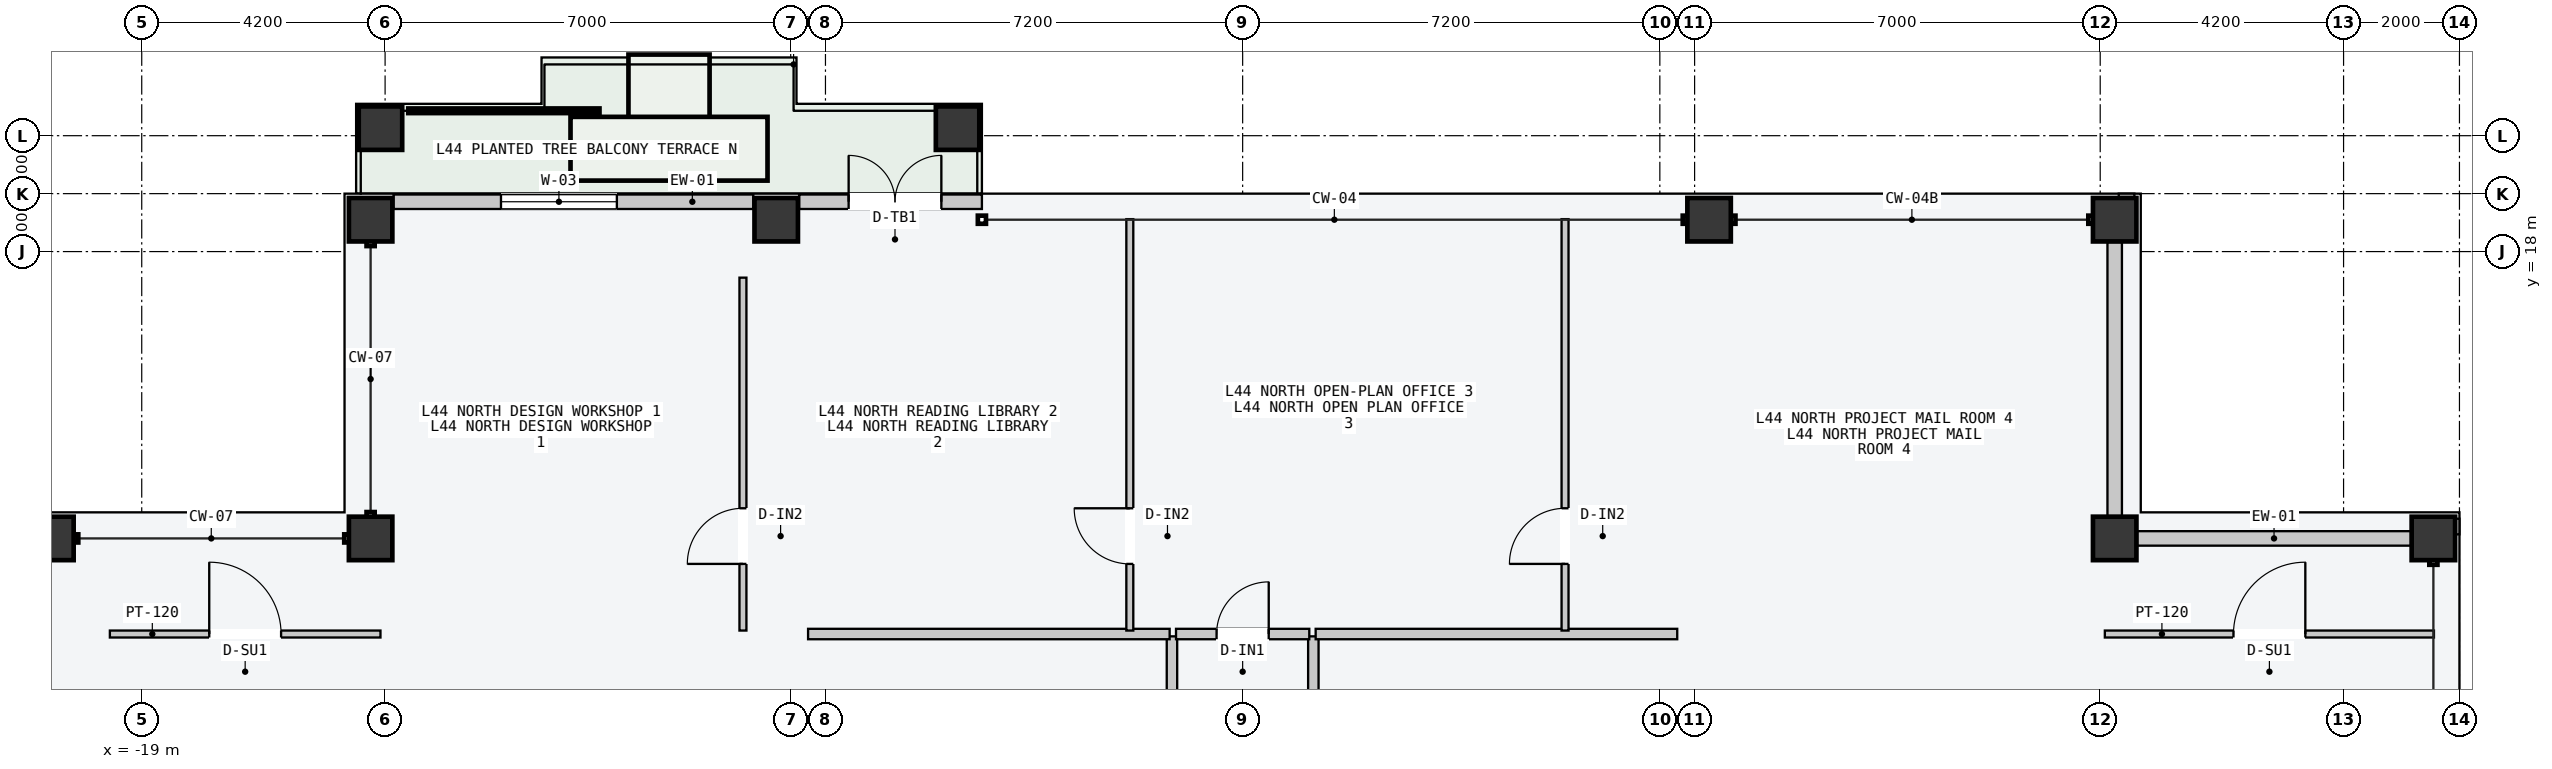
"""IFC4 building model, lengths in metres.
Left out: names, types, materials, properties, quantities, classifications, styles, units other than length and angle.
Written with IfcOpenShell. Run it as: python <this file> out.ifc"""

import sys

from ifc_helpers import new_model, si_unit, direction, frame, frame_2d, origin, origin_2d, place, context, subcontext, project, spatial, rectangle, hollow_rectangle, extrude, element, fill, save


model = new_model("IFC4")
c1 = context("Model", 3, precision=1e-05, world=origin(), true_north=direction((0.0, 1.0)))
c2 = subcontext(c1, "Body", "Model", "MODEL_VIEW")
j1 = project(units=[si_unit("LENGTHUNIT", "METRE"), si_unit("PLANEANGLEUNIT", "RADIAN")], contexts=[c1])
p1 = place(None, origin())
s1 = spatial("IfcSite", under=j1, at=p1, CompositionType="ELEMENT")
p2 = place(p1, origin())
s2 = spatial("IfcBuilding", under=s1, at=p2, CompositionType="ELEMENT")
p3 = place(p2, frame((0.0, 0.0, 169.5)))
s3 = spatial("IfcBuildingStorey", under=s2, at=p3, CompositionType="ELEMENT", Elevation=169.5)
for number, where, z_axis, x_axis in (
    (1, (-15.05, 18.55, 0.0), (0.0, 0.0, 1.0), (1.0, 0.0, 0.0)),
    (2, (-8.05, 18.55, 0.0), (0.0, 0.0, 1.0), (1.0, 0.0, 0.0)),
    (3, (8.05, 18.55, 0.0), (0.0, 0.0, 1.0), (1.0, 0.0, 0.0)),
    (4, (15.05, 18.55, 0.0), (0.0, 0.0, 1.0), (1.0, 0.0, 0.0)),
    (5, (-20.55, 13.05, 0.0), (0.0, 0.0, 1.0), (0.0, 1.0, 0.0)),
    (6, (20.55, 13.05, 0.0), (0.0, 0.0, 1.0), (0.0, 1.0, 0.0)),
    (7, (-15.05, 13.05, 0.0), (0.0, 0.0, 1.0), (1.0, 0.0, 0.0)),
    (8, (15.05, 13.05, 0.0), (0.0, 0.0, 1.0), (1.0, 0.0, 0.0)),
    (9, (-14.88, 20.13, 0.0), (0.0, 0.0, 1.0), (1.0, 0.0, 0.0)),
    (10, (-4.92, 20.13, 0.0), (0.0, 0.0, 1.0), (1.0, 0.0, 0.0)),
):
    element("IfcColumn", number, at=place(p3, frame(where, z_axis=z_axis, x_axis=x_axis)), inside=s3, PredefinedType="COLUMN", context=c2, shape_type="SweptSolid", body=[
        extrude(hollow_rectangle(XDim=0.75, YDim=0.75, WallThickness=0.032, at=origin_2d()), origin(), (0.0, 0.0, 1.0), 3.6),
    ])
p4 = place(p3, frame((-14.655, 18.86, 0.0), z_axis=(0.0, 0.0, 1.0), x_axis=(1.0, 0.0, 0.0)))
e11 = element("IfcWall", 11, at=p4, inside=s3, PredefinedType="STANDARD", context=c2, shape_type="SweptSolid", body=[
    extrude(rectangle(XDim=6.21, YDim=0.25, at=frame_2d((3.105, 0.0))), origin(), (0.0, 0.0, 1.0), 3.4),
])
p5 = place(p4, frame((1.855, 0.0, 0.85)))
e12 = element("IfcOpeningElement", 12, at=p5, cuts=e11, PredefinedType="OPENING", context=c2, shape_type="SweptSolid", body=[
    extrude(rectangle(XDim=2.0, YDim=2.1, at=frame_2d((1.0, 1.05))), frame((0.0, 0.135, 0.0), z_axis=(0.0, -1.0, 0.0), x_axis=(1.0, 0.0, 0.0)), (0.0, 0.0, 1.0), 0.27),
])
p6 = place(p3, frame((-7.655, 18.86, 0.0), z_axis=(0.0, 0.0, 1.0), x_axis=(1.0, 0.0, 0.0)))
e13 = element("IfcWall", 13, at=p6, inside=s3, PredefinedType="STANDARD", context=c2, shape_type="SweptSolid", body=[
    extrude(rectangle(XDim=3.155, YDim=0.25, at=frame_2d((1.578, 0.0))), origin(), (0.0, 0.0, 1.0), 3.4),
])
p7 = place(p6, frame((0.855, 0.0, 0.0)))
e14 = element("IfcOpeningElement", 14, at=p7, cuts=e13, PredefinedType="OPENING", context=c2, shape_type="SweptSolid", body=[
    extrude(rectangle(XDim=1.6, YDim=2.2, at=frame_2d((0.8, 1.1))), frame((0.0, 0.135, 0.0), z_axis=(0.0, -1.0, 0.0), x_axis=(1.0, 0.0, 0.0)), (0.0, 0.0, 1.0), 0.27),
])
for number, where, z_axis, x_axis in (
    (15, (15.435, 13.05, 0.0), (0.0, 0.0, 1.0), (1.0, 0.0, 0.0)),
    (16, (15.05, 13.435, 0.0), (0.0, 0.0, 1.0), (0.0, 1.0, 0.0)),
):
    element("IfcWall", number, at=place(p3, frame(where, z_axis=z_axis, x_axis=x_axis)), inside=s3, PredefinedType="STANDARD", context=c2, shape_type="SweptSolid", body=[
        extrude(rectangle(XDim=4.73, YDim=0.25, at=frame_2d((2.365, 0.0))), origin(), (0.0, 0.0, 1.0), 2.75),
    ])
for number, where, z_axis, x_axis in (
    (17, (15.12, 18.89, 0.0), (0.0, 0.0, 1.0), (1.0, 0.0, 0.0)),
    (18, (20.89, 13.12, 0.0), (0.0, 0.0, 1.0), (0.0, 1.0, 0.0)),
):
    element("IfcWall", number, at=place(p3, frame(where, z_axis=z_axis, x_axis=x_axis)), inside=s3, PredefinedType="PARAPET", context=c2, shape_type="SweptSolid", body=[
        extrude(rectangle(XDim=0.27, YDim=0.22, at=frame_2d((0.135, 0.0))), origin(), (0.0, 0.0, 1.0), 1.2),
    ])
p8 = place(p3, frame((-1.22, -3.5, 0.0), z_axis=(0.0, 0.0, 1.0), x_axis=(0.0, 1.0, 0.0)))
e19 = element("IfcWall", 19, at=p8, inside=s3, PredefinedType="PARTITIONING", context=c2, shape_type="SweptSolid", body=[
    extrude(rectangle(XDim=14.86, YDim=0.18, at=frame_2d((7.43, 0.0))), origin(), (0.0, 0.0, 1.0), 3.4),
])
p9 = place(p8, frame((6.1, 0.0, 0.0)))
e20 = element("IfcOpeningElement", 20, at=p9, cuts=e19, PredefinedType="OPENING", context=c2, shape_type="SweptSolid", body=[
    extrude(rectangle(XDim=1.24, YDim=2.24, at=frame_2d((0.62, 1.12))), frame((0.0, 0.1, 0.0), z_axis=(0.0, -1.0, 0.0), x_axis=(1.0, 0.0, 0.0)), (0.0, 0.0, 1.0), 0.2),
])
p10 = place(p8, frame((1.6, 0.0, 0.0)))
e21 = element("IfcOpeningElement", 21, at=p10, cuts=e19, PredefinedType="OPENING", context=c2, shape_type="SweptSolid", body=[
    extrude(rectangle(XDim=0.96, YDim=2.18, at=frame_2d((0.48, 1.09))), frame((0.0, 0.1, 0.0), z_axis=(0.0, -1.0, 0.0), x_axis=(1.0, 0.0, 0.0)), (0.0, 0.0, 1.0), 0.2),
])
p11 = place(p3, frame((-7.5, 11.4, 0.0), z_axis=(0.0, 0.0, 1.0), x_axis=(1.0, 0.0, 0.0)))
e22 = element("IfcWall", 22, at=p11, inside=s3, PredefinedType="PARTITIONING", context=c2, shape_type="SweptSolid", body=[
    extrude(rectangle(XDim=6.24, YDim=0.18, at=frame_2d((3.12, 0.0))), origin(), (0.0, 0.0, 1.0), 3.4),
])
p12 = place(p3, frame((1.22, -3.5, 0.0), z_axis=(0.0, 0.0, 1.0), x_axis=(0.0, 1.0, 0.0)))
e23 = element("IfcWall", 23, at=p12, inside=s3, PredefinedType="PARTITIONING", context=c2, shape_type="SweptSolid", body=[
    extrude(rectangle(XDim=14.86, YDim=0.18, at=frame_2d((7.43, 0.0))), origin(), (0.0, 0.0, 1.0), 3.4),
])
p13 = place(p12, frame((6.1, 0.0, 0.0)))
e24 = element("IfcOpeningElement", 24, at=p13, cuts=e23, PredefinedType="OPENING", context=c2, shape_type="SweptSolid", body=[
    extrude(rectangle(XDim=1.24, YDim=2.24, at=frame_2d((0.62, 1.12))), frame((0.0, 0.1, 0.0), z_axis=(0.0, -1.0, 0.0), x_axis=(1.0, 0.0, 0.0)), (0.0, 0.0, 1.0), 0.2),
])
p14 = place(p12, frame((1.6, 0.0, 0.0)))
e25 = element("IfcOpeningElement", 25, at=p14, cuts=e23, PredefinedType="OPENING", context=c2, shape_type="SweptSolid", body=[
    extrude(rectangle(XDim=0.96, YDim=2.18, at=frame_2d((0.48, 1.09))), frame((0.0, 0.1, 0.0), z_axis=(0.0, -1.0, 0.0), x_axis=(1.0, 0.0, 0.0)), (0.0, 0.0, 1.0), 0.2),
])
p15 = place(p3, frame((1.26, 11.4, 0.0), z_axis=(0.0, 0.0, 1.0), x_axis=(1.0, 0.0, 0.0)))
e26 = element("IfcWall", 26, at=p15, inside=s3, PredefinedType="PARTITIONING", context=c2, shape_type="SweptSolid", body=[
    extrude(rectangle(XDim=6.24, YDim=0.18, at=frame_2d((3.12, 0.0))), origin(), (0.0, 0.0, 1.0), 3.4),
])
p16 = place(p3, frame((-8.624, 11.46, 0.0), z_axis=(0.0, 0.0, 1.0), x_axis=(0.0, 1.0, 0.0)))
e27 = element("IfcWall", 27, at=p16, inside=s3, PredefinedType="PARTITIONING", context=c2, shape_type="SweptSolid", body=[
    extrude(rectangle(XDim=6.09, YDim=0.12, at=frame_2d((3.045, 0.0))), origin(), (0.0, 0.0, 1.0), 3.4),
])
p17 = place(p16, frame((1.15, 0.0, 0.0)))
e28 = element("IfcOpeningElement", 28, at=p17, cuts=e27, PredefinedType="OPENING", context=c2, shape_type="SweptSolid", body=[
    extrude(rectangle(XDim=0.96, YDim=2.18, at=frame_2d((0.48, 1.09))), frame((0.0, 0.07, 0.0), z_axis=(0.0, -1.0, 0.0), x_axis=(1.0, 0.0, 0.0)), (0.0, 0.0, 1.0), 0.14),
])
p18 = place(p3, frame((-1.948, 11.46, 0.0), z_axis=(0.0, 0.0, 1.0), x_axis=(0.0, 1.0, 0.0)))
e29 = element("IfcWall", 29, at=p18, inside=s3, PredefinedType="PARTITIONING", context=c2, shape_type="SweptSolid", body=[
    extrude(rectangle(XDim=7.1, YDim=0.12, at=frame_2d((3.55, 0.0))), origin(), (0.0, 0.0, 1.0), 3.4),
])
p19 = place(p18, frame((1.15, 0.0, 0.0)))
e30 = element("IfcOpeningElement", 30, at=p19, cuts=e29, PredefinedType="OPENING", context=c2, shape_type="SweptSolid", body=[
    extrude(rectangle(XDim=0.96, YDim=2.18, at=frame_2d((0.48, 1.09))), frame((0.0, 0.07, 0.0), z_axis=(0.0, -1.0, 0.0), x_axis=(1.0, 0.0, 0.0)), (0.0, 0.0, 1.0), 0.14),
])
p20 = place(p3, frame((5.564, 11.46, 0.0), z_axis=(0.0, 0.0, 1.0), x_axis=(0.0, 1.0, 0.0)))
e31 = element("IfcWall", 31, at=p20, inside=s3, PredefinedType="PARTITIONING", context=c2, shape_type="SweptSolid", body=[
    extrude(rectangle(XDim=7.1, YDim=0.12, at=frame_2d((3.55, 0.0))), origin(), (0.0, 0.0, 1.0), 3.4),
])
p21 = place(p20, frame((1.15, 0.0, 0.0)))
e32 = element("IfcOpeningElement", 32, at=p21, cuts=e31, PredefinedType="OPENING", context=c2, shape_type="SweptSolid", body=[
    extrude(rectangle(XDim=0.96, YDim=2.18, at=frame_2d((0.48, 1.09))), frame((0.0, 0.07, 0.0), z_axis=(0.0, -1.0, 0.0), x_axis=(1.0, 0.0, 0.0)), (0.0, 0.0, 1.0), 0.14),
])
p22 = place(p3, frame((-1.15, 11.4, 0.0), z_axis=(0.0, 0.0, 1.0), x_axis=(1.0, 0.0, 0.0)))
e33 = element("IfcWall", 33, at=p22, inside=s3, PredefinedType="PARTITIONING", context=c2, shape_type="SweptSolid", body=[
    extrude(rectangle(XDim=2.3, YDim=0.18, at=frame_2d((1.15, 0.0))), origin(), (0.0, 0.0, 1.0), 3.4),
])
p23 = place(p22, frame((0.7, 0.0, 0.0)))
e34 = element("IfcOpeningElement", 34, at=p23, cuts=e33, PredefinedType="OPENING", context=c2, shape_type="SweptSolid", body=[
    extrude(rectangle(XDim=0.9, YDim=2.15, at=frame_2d((0.45, 1.075))), frame((0.0, 0.1, 0.0), z_axis=(0.0, -1.0, 0.0), x_axis=(1.0, 0.0, 0.0)), (0.0, 0.0, 1.0), 0.2),
])
p24 = place(p3, frame((-19.55, 11.4, 0.0), z_axis=(0.0, 0.0, 1.0), x_axis=(1.0, 0.0, 0.0)))
e35 = element("IfcWall", 35, at=p24, inside=s3, PredefinedType="PARTITIONING", context=c2, shape_type="SweptSolid", body=[
    extrude(rectangle(XDim=4.67, YDim=0.12, at=frame_2d((2.335, 0.0))), origin(), (0.0, 0.0, 1.0), 3.4),
])
p25 = place(p24, frame((1.715, 0.0, 0.0)))
e36 = element("IfcOpeningElement", 36, at=p25, cuts=e35, PredefinedType="OPENING", context=c2, shape_type="SweptSolid", body=[
    extrude(rectangle(XDim=1.24, YDim=2.24, at=frame_2d((0.62, 1.12))), frame((0.0, 0.07, 0.0), z_axis=(0.0, -1.0, 0.0), x_axis=(1.0, 0.0, 0.0)), (0.0, 0.0, 1.0), 0.14),
])
p26 = place(p3, frame((14.88, 11.4, 0.0), z_axis=(0.0, 0.0, 1.0), x_axis=(1.0, 0.0, 0.0)))
e37 = element("IfcWall", 37, at=p26, inside=s3, PredefinedType="PARTITIONING", context=c2, shape_type="SweptSolid", body=[
    extrude(rectangle(XDim=5.68, YDim=0.12, at=frame_2d((2.84, 0.0))), origin(), (0.0, 0.0, 1.0), 3.4),
])
p27 = place(p26, frame((2.22, 0.0, 0.0)))
e38 = element("IfcOpeningElement", 38, at=p27, cuts=e37, PredefinedType="OPENING", context=c2, shape_type="SweptSolid", body=[
    extrude(rectangle(XDim=1.24, YDim=2.24, at=frame_2d((0.62, 1.12))), frame((0.0, 0.07, 0.0), z_axis=(0.0, -1.0, 0.0), x_axis=(1.0, 0.0, 0.0)), (0.0, 0.0, 1.0), 0.14),
])
p28 = place(p5, origin())
e39 = element("IfcWindow", 39, at=p28, inside=s3, PartitioningType="SINGLE_PANEL", PredefinedType="WINDOW", context=c2, shape_type="SweptSolid", body=[
    extrude(rectangle(XDim=2.0, YDim=2.1, at=frame_2d((1.0, 1.05))), frame((0.0, 0.03, 0.0), z_axis=(0.0, -1.0, 0.0), x_axis=(1.0, 0.0, 0.0)), (0.0, 0.0, 1.0), 0.06),
])
fill(e12, e39)
p29 = place(p7, origin())
e40 = element("IfcDoor", 40, at=p29, inside=s3, OperationType="DOUBLE_DOOR_SINGLE_SWING", PredefinedType="DOOR", context=c2, shape_type="SweptSolid", body=[
    extrude(rectangle(XDim=1.6, YDim=2.2, at=frame_2d((0.8, 1.1))), frame((0.0, 0.025, 0.0), z_axis=(0.0, -1.0, 0.0), x_axis=(1.0, 0.0, 0.0)), (0.0, 0.0, 1.0), 0.05),
])
fill(e14, e40)
p30 = place(p17, origin())
e41 = element("IfcDoor", 41, at=p30, inside=s3, OperationType="SINGLE_SWING_LEFT", PredefinedType="DOOR", context=c2, shape_type="SweptSolid", body=[
    extrude(rectangle(XDim=0.96, YDim=2.18, at=frame_2d((0.48, 1.09))), frame((0.0, 0.025, 0.0), z_axis=(0.0, -1.0, 0.0), x_axis=(1.0, 0.0, 0.0)), (0.0, 0.0, 1.0), 0.05),
])
fill(e28, e41)
p31 = place(p19, origin())
e42 = element("IfcDoor", 42, at=p31, inside=s3, OperationType="SINGLE_SWING_RIGHT", PredefinedType="DOOR", context=c2, shape_type="SweptSolid", body=[
    extrude(rectangle(XDim=0.96, YDim=2.18, at=frame_2d((0.48, 1.09))), frame((0.0, 0.025, 0.0), z_axis=(0.0, -1.0, 0.0), x_axis=(1.0, 0.0, 0.0)), (0.0, 0.0, 1.0), 0.05),
])
fill(e30, e42)
p32 = place(p21, origin())
e43 = element("IfcDoor", 43, at=p32, inside=s3, OperationType="SINGLE_SWING_LEFT", PredefinedType="DOOR", context=c2, shape_type="SweptSolid", body=[
    extrude(rectangle(XDim=0.96, YDim=2.18, at=frame_2d((0.48, 1.09))), frame((0.0, 0.025, 0.0), z_axis=(0.0, -1.0, 0.0), x_axis=(1.0, 0.0, 0.0)), (0.0, 0.0, 1.0), 0.05),
])
fill(e32, e43)
p33 = place(p23, origin())
e44 = element("IfcDoor", 44, at=p33, inside=s3, OperationType="SINGLE_SWING_RIGHT", PredefinedType="DOOR", context=c2, shape_type="SweptSolid", body=[
    extrude(rectangle(XDim=0.9, YDim=2.15, at=frame_2d((0.45, 1.075))), frame((0.0, 0.025, 0.0), z_axis=(0.0, -1.0, 0.0), x_axis=(1.0, 0.0, 0.0)), (0.0, 0.0, 1.0), 0.05),
])
fill(e34, e44)
p34 = place(p25, origin())
e45 = element("IfcDoor", 45, at=p34, inside=s3, OperationType="SINGLE_SWING_LEFT", PredefinedType="DOOR", context=c2, shape_type="SweptSolid", body=[
    extrude(rectangle(XDim=1.24, YDim=2.24, at=frame_2d((0.62, 1.12))), frame((0.0, 0.025, 0.0), z_axis=(0.0, -1.0, 0.0), x_axis=(1.0, 0.0, 0.0)), (0.0, 0.0, 1.0), 0.05),
])
fill(e36, e45)
p35 = place(p27, origin())
e46 = element("IfcDoor", 46, at=p35, inside=s3, OperationType="SINGLE_SWING_RIGHT", PredefinedType="DOOR", context=c2, shape_type="SweptSolid", body=[
    extrude(rectangle(XDim=1.24, YDim=2.24, at=frame_2d((0.62, 1.12))), frame((0.0, 0.025, 0.0), z_axis=(0.0, -1.0, 0.0), x_axis=(1.0, 0.0, 0.0)), (0.0, 0.0, 1.0), 0.05),
])
fill(e38, e46)
save(model, sys.argv[1])
